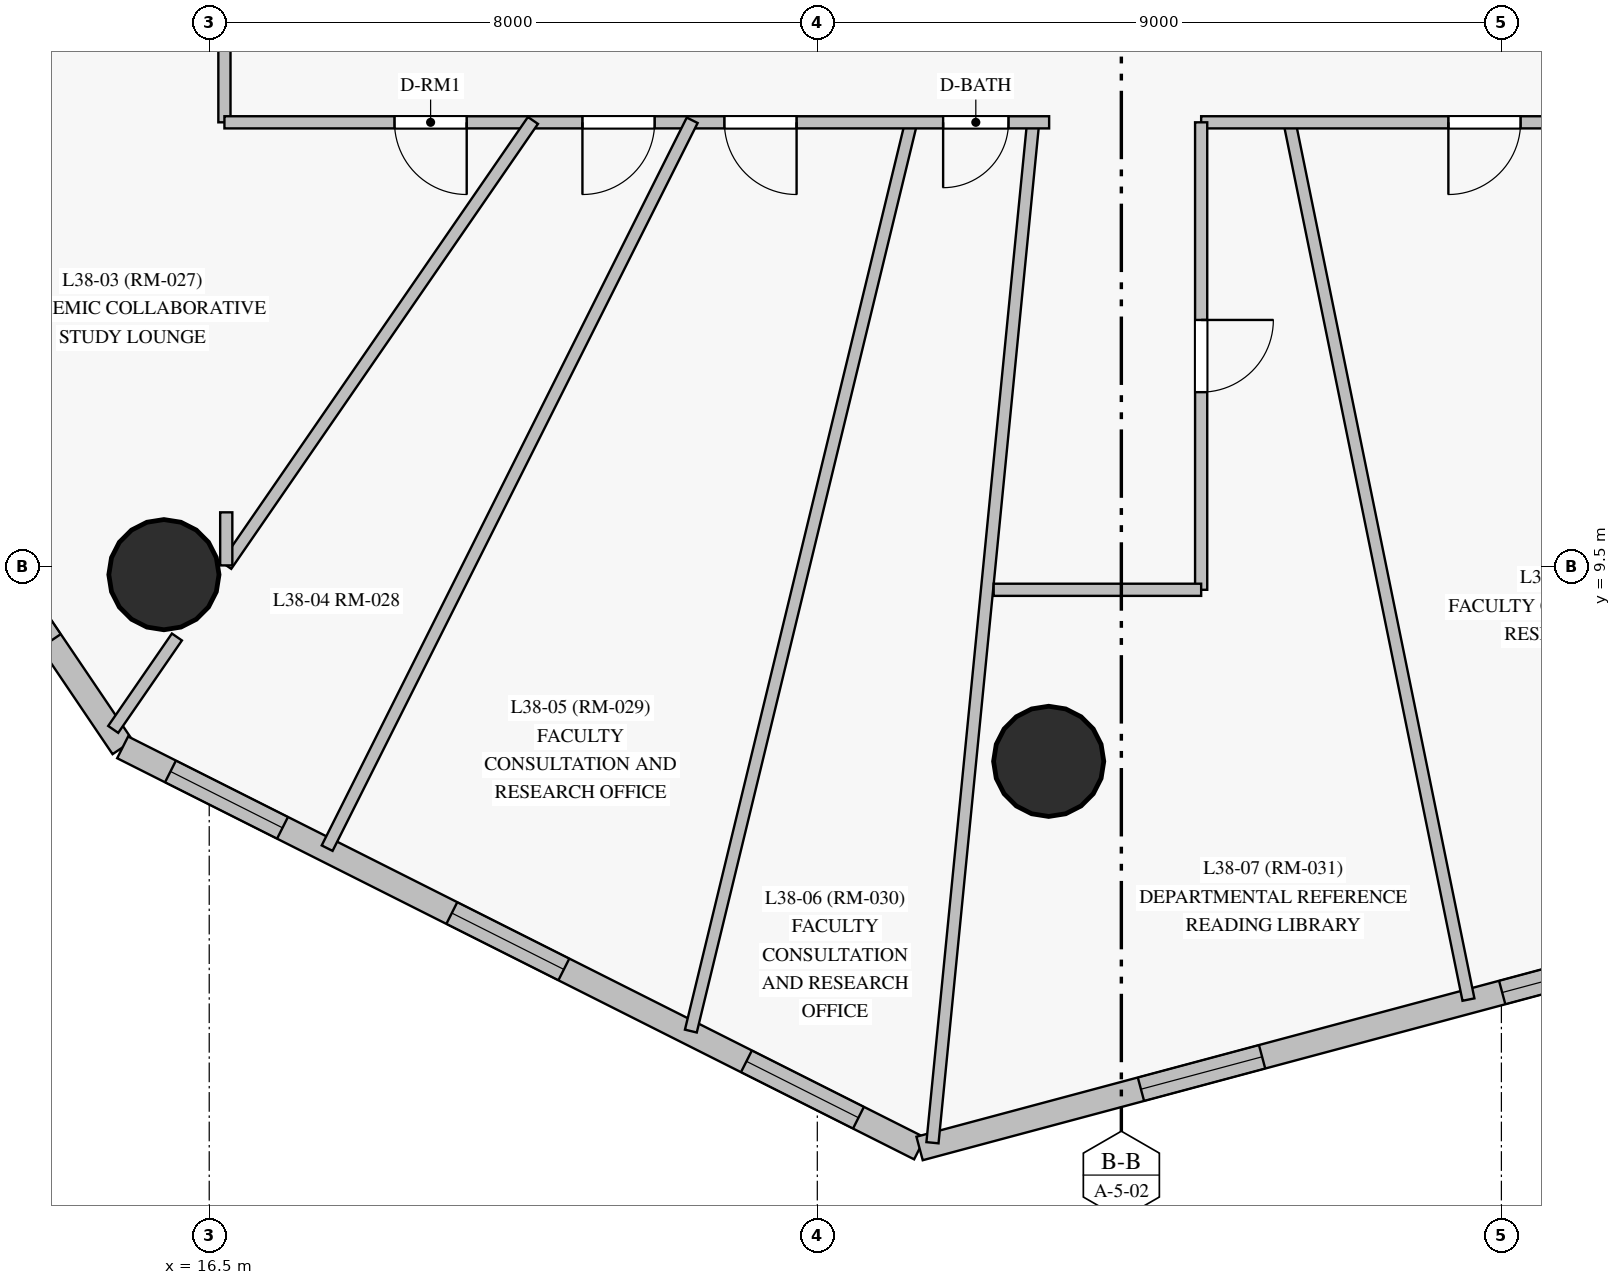
"""IFC4 building model, lengths in metres.
Left out: names, types, materials, properties, quantities, classifications, styles, units other than length and angle.
Written with IfcOpenShell. Run it as: python <this file> out.ifc"""

import sys

from ifc_helpers import new_model, si_unit, direction, frame, frame_2d, origin, origin_with_axes, origin_2d, place, context, subcontext, project, spatial, rectangle, circle, extrude, source, transform, mapped, element, fill, save


model = new_model("IFC4")
c1 = context("Model", 3, precision=1e-05, world=origin(), true_north=direction((0.0, 1.0)))
c2 = subcontext(c1, "Body", "Model", "MODEL_VIEW")
j1 = project(units=[si_unit("LENGTHUNIT", "METRE"), si_unit("PLANEANGLEUNIT", "RADIAN")], contexts=[c1])
p1 = place(None, origin())
s1 = spatial("IfcSite", under=j1, at=p1, CompositionType="ELEMENT")
p2 = place(p1, origin())
s2 = spatial("IfcBuilding", under=s1, at=p2, CompositionType="ELEMENT")
p3 = place(p2, frame((0.0, 0.0, 135.85)))
s3 = spatial("IfcBuildingStorey", under=s2, at=p3, CompositionType="ELEMENT", Elevation=135.85)
m1 = source(origin_with_axes(), c2, "Body", "SweptSolid", [
    extrude(circle(Radius=0.725, at=origin_2d()), origin(), (0.0, 0.0, 1.0), 3.05),
])
for number, where, z_axis, x_axis in (
    (1, (15.904, 9.399, 0.0), (0.0, 0.0, 1.0), (1.0, 0.0, 0.0)),
    (2, (27.544, 6.943, 0.0), (0.0, 0.0, 1.0), (1.0, 0.0, 0.0)),
):
    element("IfcColumn", number, at=place(p3, frame(where, z_axis=z_axis, x_axis=x_axis)), inside=s3, PredefinedType="COLUMN", context=c2, shape_type="MappedRepresentation", body=[
        mapped(m1, transform((0.0, 0.0, 0.0), scale=1.0)),
    ])
p4 = place(p3, frame((10.088, 14.928, 0.0), z_axis=(0.0, 0.0, 1.0), x_axis=(0.559978653474, -0.828507035368, 0.0)))
e3 = element("IfcWall", 3, at=p4, inside=s3, PredefinedType="SOLIDWALL", context=c2, shape_type="SweptSolid", body=[
    extrude(rectangle(XDim=9.416, YDim=0.32, at=frame_2d((4.708, 0.0))), origin(), (0.0, 0.0, 1.0), 2.825),
])
p5 = place(p4, frame((2.241, 0.0, 0.85)))
e4 = element("IfcOpeningElement", 4, at=p5, cuts=e3, PredefinedType="OPENING", context=c2, shape_type="SweptSolid", body=[
    extrude(rectangle(XDim=1.65, YDim=1.65, at=frame_2d((0.825, 0.825))), frame((0.0, 0.17, 0.0), z_axis=(0.0, -1.0, 0.0), x_axis=(1.0, 0.0, 0.0)), (0.0, 0.0, 1.0), 0.34),
])
p6 = place(p4, frame((6.076, 0.0, 0.85)))
e5 = element("IfcOpeningElement", 5, at=p6, cuts=e3, PredefinedType="OPENING", context=c2, shape_type="SweptSolid", body=[
    extrude(rectangle(XDim=1.65, YDim=1.65, at=frame_2d((0.825, 0.825))), frame((0.0, 0.17, 0.0), z_axis=(0.0, -1.0, 0.0), x_axis=(1.0, 0.0, 0.0)), (0.0, 0.0, 1.0), 0.34),
])
p7 = place(p3, frame((15.361, 7.127, 0.0), z_axis=(0.0, 0.0, 1.0), x_axis=(0.893242675261, -0.449574824798, 0.0)))
e6 = element("IfcWall", 6, at=p7, inside=s3, PredefinedType="SOLIDWALL", context=c2, shape_type="SweptSolid", body=[
    extrude(rectangle(XDim=11.738, YDim=0.32, at=frame_2d((5.869, 0.0))), origin(), (0.0, 0.0, 1.0), 2.825),
])
p8 = place(p7, frame((0.705, 0.0, 0.85)))
e7 = element("IfcOpeningElement", 7, at=p8, cuts=e6, PredefinedType="OPENING", context=c2, shape_type="SweptSolid", body=[
    extrude(rectangle(XDim=1.65, YDim=1.65, at=frame_2d((0.825, 0.825))), frame((0.0, 0.17, 0.0), z_axis=(0.0, -1.0, 0.0), x_axis=(1.0, 0.0, 0.0)), (0.0, 0.0, 1.0), 0.34),
])
p9 = place(p7, frame((4.848, 0.0, 0.85)))
e8 = element("IfcOpeningElement", 8, at=p9, cuts=e6, PredefinedType="OPENING", context=c2, shape_type="SweptSolid", body=[
    extrude(rectangle(XDim=1.65, YDim=1.65, at=frame_2d((0.825, 0.825))), frame((0.0, 0.17, 0.0), z_axis=(0.0, -1.0, 0.0), x_axis=(1.0, 0.0, 0.0)), (0.0, 0.0, 1.0), 0.34),
])
p10 = place(p7, frame((9.188, 0.0, 0.85)))
e9 = element("IfcOpeningElement", 9, at=p10, cuts=e6, PredefinedType="OPENING", context=c2, shape_type="SweptSolid", body=[
    extrude(rectangle(XDim=1.65, YDim=1.65, at=frame_2d((0.825, 0.825))), frame((0.0, 0.17, 0.0), z_axis=(0.0, -1.0, 0.0), x_axis=(1.0, 0.0, 0.0)), (0.0, 0.0, 1.0), 0.34),
])
p11 = place(p3, frame((25.846, 1.85, 0.0), z_axis=(0.0, 0.0, 1.0), x_axis=(0.965995584308, 0.258558564154, 0.0)))
e10 = element("IfcWall", 10, at=p11, inside=s3, PredefinedType="SOLIDWALL", context=c2, shape_type="SweptSolid", body=[
    extrude(rectangle(XDim=9.395, YDim=0.32, at=frame_2d((4.698, 0.0))), origin(), (0.0, 0.0, 1.0), 2.825),
])
p12 = place(p11, frame((3.015, 0.0, 0.85)))
e11 = element("IfcOpeningElement", 11, at=p12, cuts=e10, PredefinedType="OPENING", context=c2, shape_type="SweptSolid", body=[
    extrude(rectangle(XDim=1.65, YDim=1.65, at=frame_2d((0.825, 0.825))), frame((0.0, 0.17, 0.0), z_axis=(0.0, -1.0, 0.0), x_axis=(1.0, 0.0, 0.0)), (0.0, 0.0, 1.0), 0.34),
])
p13 = place(p11, frame((7.935, 0.0, 0.85)))
e12 = element("IfcOpeningElement", 12, at=p13, cuts=e10, PredefinedType="OPENING", context=c2, shape_type="SweptSolid", body=[
    extrude(rectangle(XDim=0.95, YDim=1.5, at=frame_2d((0.475, 0.75))), frame((0.0, 0.17, 0.0), z_axis=(0.0, -1.0, 0.0), x_axis=(1.0, 0.0, 0.0)), (0.0, 0.0, 1.0), 0.34),
])
p14 = place(p3, frame((16.7, 15.35, 0.0), z_axis=(0.0, 0.0, 1.0), x_axis=(0.0, 1.0, 0.0)))
e13 = element("IfcWall", 13, at=p14, inside=s3, PredefinedType="PARTITIONING", context=c2, shape_type="SweptSolid", body=[
    extrude(rectangle(XDim=22.3, YDim=0.16, at=frame_2d((11.15, 0.0))), origin(), (0.0, 0.0, 1.0), 2.225),
])
p15 = place(p14, frame((7.33, 0.0, 0.0)))
e14 = element("IfcOpeningElement", 14, at=p15, cuts=e13, PredefinedType="OPENING", context=c2, shape_type="SweptSolid", body=[
    extrude(rectangle(XDim=0.95, YDim=2.15, at=frame_2d((0.475, 1.075))), frame((0.0, 0.09, 0.0), z_axis=(0.0, -1.0, 0.0), x_axis=(1.0, 0.0, 0.0)), (0.0, 0.0, 1.0), 0.18),
])
p16 = place(p14, frame((3.903, 0.0, 0.0)))
e15 = element("IfcOpeningElement", 15, at=p16, cuts=e13, PredefinedType="OPENING", context=c2, shape_type="SweptSolid", body=[
    extrude(rectangle(XDim=0.96, YDim=2.15, at=frame_2d((0.48, 1.075))), frame((0.0, 0.09, 0.0), z_axis=(0.0, -1.0, 0.0), x_axis=(1.0, 0.0, 0.0)), (0.0, 0.0, 1.0), 0.18),
])
p17 = place(p14, frame((18.341, 0.0, 0.0)))
e16 = element("IfcOpeningElement", 16, at=p17, cuts=e13, PredefinedType="OPENING", context=c2, shape_type="SweptSolid", body=[
    extrude(rectangle(XDim=0.95, YDim=2.15, at=frame_2d((0.475, 1.075))), frame((0.0, 0.09, 0.0), z_axis=(0.0, -1.0, 0.0), x_axis=(1.0, 0.0, 0.0)), (0.0, 0.0, 1.0), 0.18),
])
p18 = place(p14, frame((14.02, 0.0, 0.0)))
e17 = element("IfcOpeningElement", 17, at=p18, cuts=e13, PredefinedType="OPENING", context=c2, shape_type="SweptSolid", body=[
    extrude(rectangle(XDim=0.95, YDim=2.15, at=frame_2d((0.475, 1.075))), frame((0.0, 0.09, 0.0), z_axis=(0.0, -1.0, 0.0), x_axis=(1.0, 0.0, 0.0)), (0.0, 0.0, 1.0), 0.18),
])
p19 = place(p14, frame((10.675, 0.0, 0.0)))
e18 = element("IfcOpeningElement", 18, at=p19, cuts=e13, PredefinedType="OPENING", context=c2, shape_type="SweptSolid", body=[
    extrude(rectangle(XDim=0.95, YDim=2.15, at=frame_2d((0.475, 1.075))), frame((0.0, 0.09, 0.0), z_axis=(0.0, -1.0, 0.0), x_axis=(1.0, 0.0, 0.0)), (0.0, 0.0, 1.0), 0.18),
])
p20 = place(p3, frame((27.343, 15.38, 0.0), z_axis=(0.0, 0.0, 1.0), x_axis=(-0.098182344394, -0.995168441647, 0.0)))
e19 = element("IfcWall", 19, at=p20, inside=s3, PredefinedType="PARTITIONING", context=c2, shape_type="SweptSolid", body=[
    extrude(rectangle(XDim=13.52, YDim=0.16, at=frame_2d((6.76, 0.0))), origin(), (0.0, 0.0, 1.0), 2.225),
])
p21 = place(p3, frame((25.742, 15.379, 0.0), z_axis=(0.0, 0.0, 1.0), x_axis=(-0.235611924803, -0.971847220961, 0.0)))
e20 = element("IfcWall", 20, at=p21, inside=s3, PredefinedType="PARTITIONING", context=c2, shape_type="SweptSolid", body=[
    extrude(rectangle(XDim=12.332, YDim=0.16, at=frame_2d((6.166, 0.0))), origin(), (0.0, 0.0, 1.0), 2.825),
])
p22 = place(p3, frame((30.707, 15.379, 0.0), z_axis=(0.0, 0.0, 1.0), x_axis=(0.199840113041, -0.979828520314, 0.0)))
e21 = element("IfcWall", 21, at=p22, inside=s3, PredefinedType="PARTITIONING", context=c2, shape_type="SweptSolid", body=[
    extrude(rectangle(XDim=11.809, YDim=0.16, at=frame_2d((5.904, 0.0))), origin(), (0.0, 0.0, 1.0), 2.825),
])
p23 = place(p3, frame((27.55, 15.35, 0.0), z_axis=(0.0, 0.0, 1.0), x_axis=(-1.0, 0.0, 0.0)))
e22 = element("IfcWall", 22, at=p23, inside=s3, PredefinedType="PARTITIONING", context=c2, shape_type="SweptSolid", body=[
    extrude(rectangle(XDim=10.85, YDim=0.16, at=frame_2d((5.425, 0.0))), origin(), (0.0, 0.0, 1.0), 2.325),
])
p24 = place(p23, frame((7.663, 0.0, 0.0)))
e23 = element("IfcOpeningElement", 23, at=p24, cuts=e22, PredefinedType="OPENING", context=c2, shape_type="SweptSolid", body=[
    extrude(rectangle(XDim=0.95, YDim=2.15, at=frame_2d((0.475, 1.075))), frame((0.0, 0.09, 0.0), z_axis=(0.0, -1.0, 0.0), x_axis=(1.0, 0.0, 0.0)), (0.0, 0.0, 1.0), 0.18),
])
p25 = place(p23, frame((5.19, 0.0, 0.0)))
e24 = element("IfcOpeningElement", 24, at=p25, cuts=e22, PredefinedType="OPENING", context=c2, shape_type="SweptSolid", body=[
    extrude(rectangle(XDim=0.95, YDim=2.15, at=frame_2d((0.475, 1.075))), frame((0.0, 0.09, 0.0), z_axis=(0.0, -1.0, 0.0), x_axis=(1.0, 0.0, 0.0)), (0.0, 0.0, 1.0), 0.18),
])
p26 = place(p23, frame((3.323, 0.0, 0.0)))
e25 = element("IfcOpeningElement", 25, at=p26, cuts=e22, PredefinedType="OPENING", context=c2, shape_type="SweptSolid", body=[
    extrude(rectangle(XDim=0.95, YDim=2.15, at=frame_2d((0.475, 1.075))), frame((0.0, 0.09, 0.0), z_axis=(0.0, -1.0, 0.0), x_axis=(1.0, 0.0, 0.0)), (0.0, 0.0, 1.0), 0.18),
])
p27 = place(p23, frame((0.535, 0.0, 0.0)))
e26 = element("IfcOpeningElement", 26, at=p27, cuts=e22, PredefinedType="OPENING", context=c2, shape_type="SweptSolid", body=[
    extrude(rectangle(XDim=0.86, YDim=2.1, at=frame_2d((0.43, 1.05))), frame((0.0, 0.09, 0.0), z_axis=(0.0, -1.0, 0.0), x_axis=(1.0, 0.0, 0.0)), (0.0, 0.0, 1.0), 0.18),
])
p28 = place(p3, frame((22.854, 15.377, 0.0), z_axis=(0.0, 0.0, 1.0), x_axis=(-0.448325403078, -0.893870422911, 0.0)))
e27 = element("IfcWall", 27, at=p28, inside=s3, PredefinedType="PARTITIONING", context=c2, shape_type="SweptSolid", body=[
    extrude(rectangle(XDim=10.713, YDim=0.16, at=frame_2d((5.356, 0.0))), origin(), (0.0, 0.0, 1.0), 2.825),
])
p29 = place(p3, frame((40.2, 15.35, 0.0), z_axis=(0.0, 0.0, 1.0), x_axis=(-1.0, 0.0, 0.0)))
e28 = element("IfcWall", 28, at=p29, inside=s3, PredefinedType="PARTITIONING", context=c2, shape_type="SweptSolid", body=[
    extrude(rectangle(XDim=10.65, YDim=0.16, at=frame_2d((5.325, 0.0))), origin(), (0.0, 0.0, 1.0), 2.225),
])
p30 = place(p29, frame((6.448, 0.0, 0.0)))
e29 = element("IfcOpeningElement", 29, at=p30, cuts=e28, PredefinedType="OPENING", context=c2, shape_type="SweptSolid", body=[
    extrude(rectangle(XDim=0.95, YDim=2.15, at=frame_2d((0.475, 1.075))), frame((0.0, 0.09, 0.0), z_axis=(0.0, -1.0, 0.0), x_axis=(1.0, 0.0, 0.0)), (0.0, 0.0, 1.0), 0.18),
])
p31 = place(p29, frame((4.56, 0.0, 0.0)))
e30 = element("IfcOpeningElement", 30, at=p31, cuts=e28, PredefinedType="OPENING", context=c2, shape_type="SweptSolid", body=[
    extrude(rectangle(XDim=0.95, YDim=2.15, at=frame_2d((0.475, 1.075))), frame((0.0, 0.09, 0.0), z_axis=(0.0, -1.0, 0.0), x_axis=(1.0, 0.0, 0.0)), (0.0, 0.0, 1.0), 0.18),
])
p32 = place(p3, frame((20.759, 15.375, 0.0), z_axis=(0.0, 0.0, 1.0), x_axis=(-0.567487382716, -0.823382092627, 0.0)))
e31 = element("IfcWall", 31, at=p32, inside=s3, PredefinedType="PARTITIONING", context=c2, shape_type="SweptSolid", body=[
    extrude(rectangle(XDim=7.11, YDim=0.16, at=frame_2d((3.555, 0.0))), origin(), (0.0, 0.0, 1.0), 2.825),
])
p33 = place(p3, frame((29.55, 15.35, 0.0), z_axis=(0.0, 0.0, 1.0), x_axis=(0.0, -1.0, 0.0)))
e32 = element("IfcWall", 32, at=p33, inside=s3, PredefinedType="PARTITIONING", context=c2, shape_type="SweptSolid", body=[
    extrude(rectangle(XDim=6.15, YDim=0.16, at=frame_2d((3.075, 0.0))), origin(), (0.0, 0.0, 1.0), 2.825),
])
p34 = place(p33, frame((2.6, 0.0, 0.0)))
e33 = element("IfcOpeningElement", 33, at=p34, cuts=e32, PredefinedType="OPENING", context=c2, shape_type="SweptSolid", body=[
    extrude(rectangle(XDim=0.95, YDim=2.15, at=frame_2d((0.475, 1.075))), frame((0.0, 0.09, 0.0), z_axis=(0.0, -1.0, 0.0), x_axis=(1.0, 0.0, 0.0)), (0.0, 0.0, 1.0), 0.18),
])
p35 = place(p3, frame((16.725, 18.481, 0.0), z_axis=(0.0, 0.0, 1.0), x_axis=(-0.8241595355, -0.566357713856, 0.0)))
e34 = element("IfcWall", 34, at=p35, inside=s3, PredefinedType="PARTITIONING", context=c2, shape_type="SweptSolid", body=[
    extrude(rectangle(XDim=5.753, YDim=0.16, at=frame_2d((2.876, 0.0))), origin(), (0.0, 0.0, 1.0), 2.825),
])
p36 = place(p3, frame((29.55, 9.2, 0.0), z_axis=(0.0, 0.0, 1.0), x_axis=(-1.0, 0.0, 0.0)))
e35 = element("IfcWall", 35, at=p36, inside=s3, PredefinedType="PARTITIONING", context=c2, shape_type="SweptSolid", body=[
    extrude(rectangle(XDim=2.73, YDim=0.16, at=frame_2d((1.365, 0.0))), origin(), (0.0, 0.0, 1.0), 2.325),
])
p37 = place(p3, frame((16.075, 8.579, 0.0), z_axis=(0.0, 0.0, 1.0), x_axis=(-0.567566818145, -0.823327338876, 0.0)))
e36 = element("IfcWall", 36, at=p37, inside=s3, PredefinedType="PARTITIONING", context=c2, shape_type="SweptSolid", body=[
    extrude(rectangle(XDim=1.477, YDim=0.16, at=frame_2d((0.738, 0.0))), origin(), (0.0, 0.0, 1.0), 2.825),
])
p38 = place(p3, frame((16.724, 9.521, 0.0), z_axis=(0.0, 0.0, 1.0), x_axis=(0.0, 1.0, 0.0)))
e37 = element("IfcWall", 37, at=p38, inside=s3, PredefinedType="PARTITIONING", context=c2, shape_type="SweptSolid", body=[
    extrude(rectangle(XDim=0.698, YDim=0.16, at=frame_2d((0.349, 0.0))), origin(), (0.0, 0.0, 1.0), 2.225),
])
m2 = source(origin_with_axes(), c2, "Body", "SweptSolid", [
    extrude(rectangle(XDim=1.65, YDim=1.65, at=frame_2d((0.825, 0.825))), frame((0.0, 0.03, 0.0), z_axis=(0.0, -1.0, 0.0), x_axis=(1.0, 0.0, 0.0)), (0.0, 0.0, 1.0), 0.06),
])
p39 = place(p6, origin())
e38 = element("IfcWindow", 38, at=p39, inside=s3, PartitioningType="SINGLE_PANEL", PredefinedType="WINDOW", context=c2, shape_type="MappedRepresentation", body=[
    mapped(m2, transform((0.0, 0.0, 0.0), scale=1.0)),
])
fill(e5, e38)
p40 = place(p8, origin())
e39 = element("IfcWindow", 39, at=p40, inside=s3, PartitioningType="SINGLE_PANEL", PredefinedType="WINDOW", context=c2, shape_type="MappedRepresentation", body=[
    mapped(m2, transform((0.0, 0.0, 0.0), scale=1.0)),
])
fill(e7, e39)
p41 = place(p9, origin())
e40 = element("IfcWindow", 40, at=p41, inside=s3, PartitioningType="SINGLE_PANEL", PredefinedType="WINDOW", context=c2, shape_type="MappedRepresentation", body=[
    mapped(m2, transform((0.0, 0.0, 0.0), scale=1.0)),
])
fill(e8, e40)
p42 = place(p10, origin())
e41 = element("IfcWindow", 41, at=p42, inside=s3, PartitioningType="SINGLE_PANEL", PredefinedType="WINDOW", context=c2, shape_type="MappedRepresentation", body=[
    mapped(m2, transform((0.0, 0.0, 0.0), scale=1.0)),
])
fill(e9, e41)
p43 = place(p12, origin())
e42 = element("IfcWindow", 42, at=p43, inside=s3, PartitioningType="SINGLE_PANEL", PredefinedType="WINDOW", context=c2, shape_type="MappedRepresentation", body=[
    mapped(m2, transform((0.0, 0.0, 0.0), scale=1.0)),
])
fill(e11, e42)
m3 = source(origin_with_axes(), c2, "Body", "SweptSolid", [
    extrude(rectangle(XDim=0.95, YDim=1.5, at=frame_2d((0.475, 0.75))), frame((0.0, 0.03, 0.0), z_axis=(0.0, -1.0, 0.0), x_axis=(1.0, 0.0, 0.0)), (0.0, 0.0, 1.0), 0.06),
])
p44 = place(p13, origin())
e43 = element("IfcWindow", 43, at=p44, inside=s3, PartitioningType="SINGLE_PANEL", PredefinedType="WINDOW", context=c2, shape_type="MappedRepresentation", body=[
    mapped(m3, transform((0.0, 0.0, 0.0), scale=1.0)),
])
fill(e12, e43)
m4 = source(origin_with_axes(), c2, "Body", "SweptSolid", [
    extrude(rectangle(XDim=0.95, YDim=2.15, at=frame_2d((0.475, 1.075))), frame((0.0, 0.025, 0.0), z_axis=(0.0, -1.0, 0.0), x_axis=(1.0, 0.0, 0.0)), (0.0, 0.0, 1.0), 0.05),
])
p45 = place(p24, origin())
e44 = element("IfcDoor", 44, at=p45, inside=s3, OperationType="SINGLE_SWING_LEFT", PredefinedType="DOOR", context=c2, shape_type="MappedRepresentation", body=[
    mapped(m4, transform((0.0, 0.0, 0.0), scale=1.0)),
])
fill(e23, e44)
p46 = place(p25, origin())
e45 = element("IfcDoor", 45, at=p46, inside=s3, OperationType="SINGLE_SWING_RIGHT", PredefinedType="DOOR", context=c2, shape_type="MappedRepresentation", body=[
    mapped(m4, transform((0.0, 0.0, 0.0), scale=1.0)),
])
fill(e24, e45)
p47 = place(p26, origin())
e46 = element("IfcDoor", 46, at=p47, inside=s3, OperationType="SINGLE_SWING_LEFT", PredefinedType="DOOR", context=c2, shape_type="MappedRepresentation", body=[
    mapped(m4, transform((0.0, 0.0, 0.0), scale=1.0)),
])
fill(e25, e46)
m5 = source(origin_with_axes(), c2, "Body", "SweptSolid", [
    extrude(rectangle(XDim=0.86, YDim=2.1, at=frame_2d((0.43, 1.05))), frame((0.0, 0.025, 0.0), z_axis=(0.0, -1.0, 0.0), x_axis=(1.0, 0.0, 0.0)), (0.0, 0.0, 1.0), 0.05),
])
p48 = place(p27, origin())
e47 = element("IfcDoor", 47, at=p48, inside=s3, OperationType="SINGLE_SWING_RIGHT", PredefinedType="DOOR", context=c2, shape_type="MappedRepresentation", body=[
    mapped(m5, transform((0.0, 0.0, 0.0), scale=1.0)),
])
fill(e26, e47)
p49 = place(p34, origin())
e48 = element("IfcDoor", 48, at=p49, inside=s3, OperationType="SINGLE_SWING_LEFT", PredefinedType="DOOR", context=c2, shape_type="MappedRepresentation", body=[
    mapped(m4, transform((0.0, 0.0, 0.0), scale=1.0)),
])
fill(e33, e48)
p50 = place(p30, origin())
e49 = element("IfcDoor", 49, at=p50, inside=s3, OperationType="SINGLE_SWING_RIGHT", PredefinedType="DOOR", context=c2, shape_type="MappedRepresentation", body=[
    mapped(m4, transform((0.0, 0.0, 0.0), scale=1.0)),
])
fill(e29, e49)
save(model, sys.argv[1])
